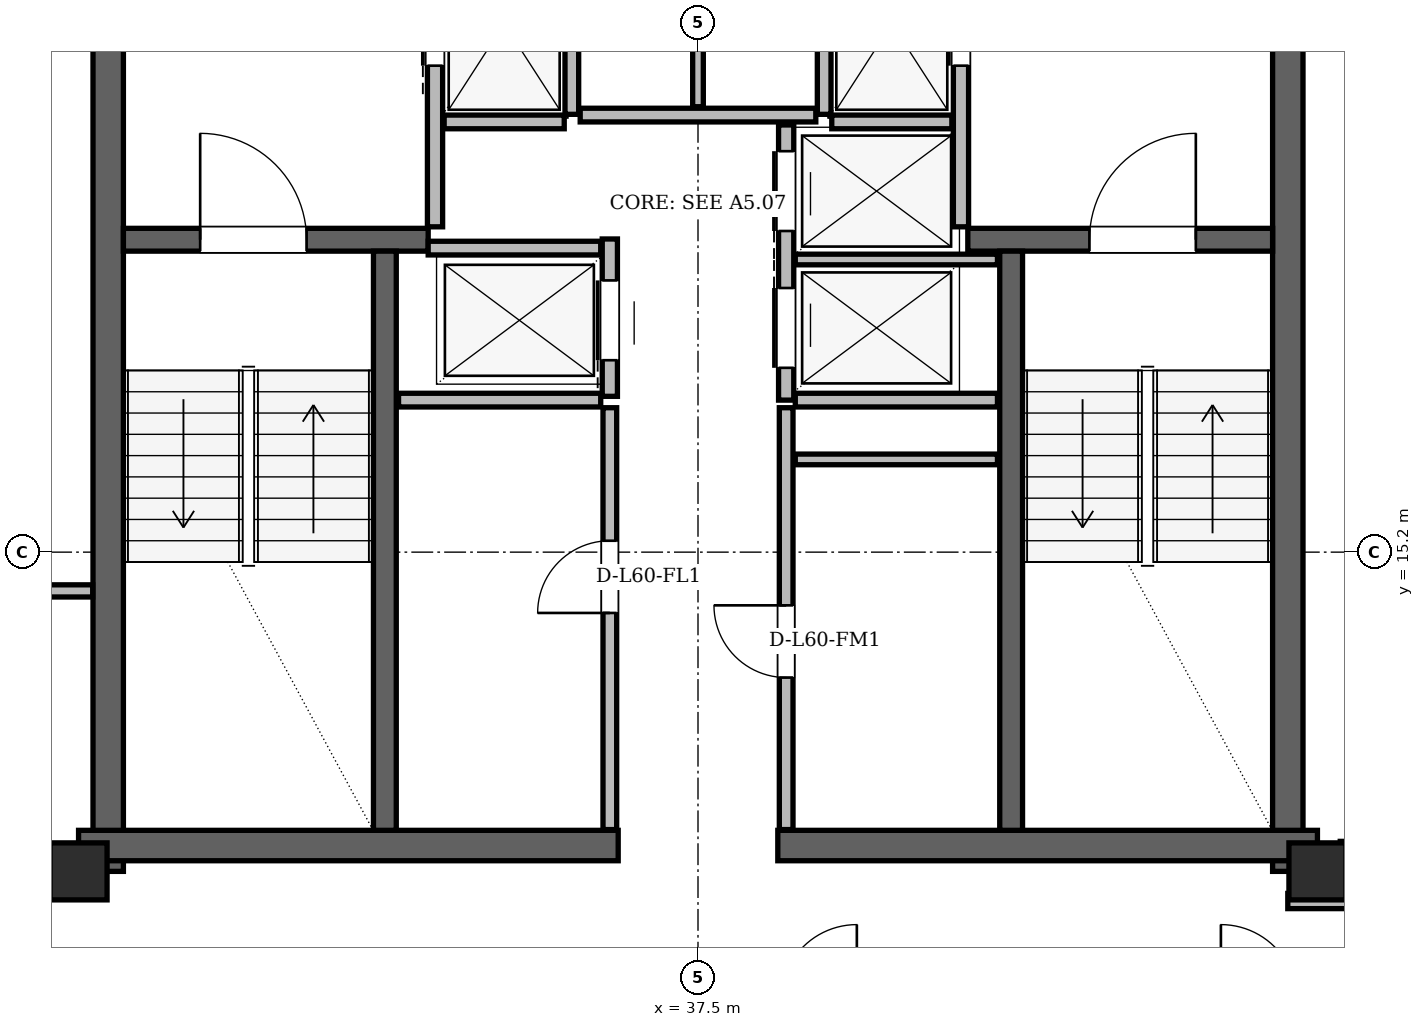
"""IFC4 building model, lengths in metres.
Left out: names, types, materials, properties, quantities, classifications, styles, units other than length and angle.
Written with IfcOpenShell. Run it as: python <this file> out.ifc"""

import sys

from ifc_helpers import new_model, si_unit, direction, frame, frame_2d, origin, origin_2d, place, context, subcontext, project, spatial, rectangle, hollow_rectangle, extrude, element, fill, save


model = new_model("IFC4")
c1 = context("Model", 3, precision=1e-05, world=origin(), true_north=direction((0.0, 1.0)))
c2 = subcontext(c1, "Body", "Model", "MODEL_VIEW")
j1 = project(units=[si_unit("LENGTHUNIT", "METRE"), si_unit("PLANEANGLEUNIT", "RADIAN")], contexts=[c1])
p1 = place(None, origin())
s1 = spatial("IfcSite", under=j1, at=p1, CompositionType="ELEMENT")
p2 = place(p1, origin())
s2 = spatial("IfcBuilding", under=s1, at=p2, CompositionType="ELEMENT")
p3 = place(p2, frame((0.0, 0.0, 227.1)))
s3 = spatial("IfcBuildingStorey", under=s2, at=p3, CompositionType="ELEMENT", Elevation=227.1)
for number, where, z_axis, x_axis in (
    (1, (29.35, 11.0, 0.0), (0.0, 0.0, 1.0), (1.0, 0.0, 0.0)),
    (2, (45.65, 11.0, 0.0), (0.0, 0.0, 1.0), (1.0, 0.0, 0.0)),
):
    element("IfcColumn", number, at=place(p3, frame(where, z_axis=z_axis, x_axis=x_axis)), inside=s3, PredefinedType="COLUMN", context=c2, shape_type="SweptSolid", body=[
        extrude(hollow_rectangle(XDim=0.75, YDim=0.75, WallThickness=0.06, at=origin_2d()), origin(), (0.0, 0.0, 1.0), 3.6),
    ])
for number, where, z_axis, x_axis in (
    (3, (29.74, 11.0, 0.0), (0.0, 0.0, 1.0), (0.0, 1.0, 0.0)),
    (4, (45.26, 11.0, 0.0), (0.0, 0.0, 1.0), (0.0, 1.0, 0.0)),
):
    element("IfcWall", number, at=place(p3, frame(where, z_axis=z_axis, x_axis=x_axis)), inside=s3, PredefinedType="SHEAR", context=c2, shape_type="SweptSolid", body=[
        extrude(rectangle(XDim=13.3, YDim=0.4, at=frame_2d((6.65, 0.0))), origin(), (0.0, 0.0, 1.0), 3.38),
    ])
for number, where, z_axis, x_axis in (
    (5, (29.35, 11.34, 0.0), (0.0, 0.0, 1.0), (1.0, 0.0, 0.0)),
    (6, (38.55, 11.34, 0.0), (0.0, 0.0, 1.0), (1.0, 0.0, 0.0)),
):
    element("IfcWall", number, at=place(p3, frame(where, z_axis=z_axis, x_axis=x_axis)), inside=s3, PredefinedType="SHEAR", context=c2, shape_type="SweptSolid", body=[
        extrude(rectangle(XDim=7.1, YDim=0.4, at=frame_2d((3.55, 0.0))), origin(), (0.0, 0.0, 1.0), 3.38),
    ])
p4 = place(p3, frame((29.94, 19.31, 0.0), z_axis=(0.0, 0.0, 1.0), x_axis=(1.0, 0.0, 0.0)))
e7 = element("IfcWall", 7, at=p4, inside=s3, PredefinedType="SHEAR", context=c2, shape_type="SweptSolid", body=[
    extrude(rectangle(XDim=4.01, YDim=0.3, at=frame_2d((2.005, 0.0))), origin(), (0.0, 0.0, 1.0), 3.38),
])
p5 = place(p4, frame((1.01, 0.0, 0.0)))
e8 = element("IfcOpeningElement", 8, at=p5, cuts=e7, PredefinedType="OPENING", context=c2, shape_type="SweptSolid", body=[
    extrude(rectangle(XDim=1.4, YDim=2.2, at=frame_2d((0.7, 1.1))), frame((0.0, 0.15, 0.0), z_axis=(0.0, -1.0, 0.0), x_axis=(1.0, 0.0, 0.0)), (0.0, 0.0, 1.0), 0.3),
])
p6 = place(p3, frame((41.05, 19.31, 0.0), z_axis=(0.0, 0.0, 1.0), x_axis=(1.0, 0.0, 0.0)))
e9 = element("IfcWall", 9, at=p6, inside=s3, PredefinedType="SHEAR", context=c2, shape_type="SweptSolid", body=[
    extrude(rectangle(XDim=4.01, YDim=0.3, at=frame_2d((2.005, 0.0))), origin(), (0.0, 0.0, 1.0), 3.38),
])
p7 = place(p6, frame((1.6, 0.0, 0.0)))
e10 = element("IfcOpeningElement", 10, at=p7, cuts=e9, PredefinedType="OPENING", context=c2, shape_type="SweptSolid", body=[
    extrude(rectangle(XDim=1.4, YDim=2.2, at=frame_2d((0.7, 1.1))), frame((0.0, 0.15, 0.0), z_axis=(0.0, -1.0, 0.0), x_axis=(1.0, 0.0, 0.0)), (0.0, 0.0, 1.0), 0.3),
])
for number, where, z_axis, x_axis in (
    (11, (33.38, 11.54, 0.0), (0.0, 0.0, 1.0), (0.0, 1.0, 0.0)),
    (12, (41.62, 11.54, 0.0), (0.0, 0.0, 1.0), (0.0, 1.0, 0.0)),
):
    element("IfcWall", number, at=place(p3, frame(where, z_axis=z_axis, x_axis=x_axis)), inside=s3, PredefinedType="SHEAR", context=c2, shape_type="SweptSolid", body=[
        extrude(rectangle(XDim=7.62, YDim=0.3, at=frame_2d((3.81, 0.0))), origin(), (0.0, 0.0, 1.0), 3.38),
    ])
p8 = place(p3, frame((34.344, 43.135, 0.0), z_axis=(0.0, 0.0, 1.0), x_axis=(-0.499998927115, -0.866026023214, 0.0)))
e13 = element("IfcWall", 13, at=p8, inside=s3, PredefinedType="SOLIDWALL", context=c2, shape_type="SweptSolid", body=[
    extrude(rectangle(XDim=36.742, YDim=0.29, at=frame_2d((18.371, 0.0))), origin(), (0.0, 0.0, 1.0), 2.677),
])
p9 = place(p8, frame((8.664, 0.0, 0.0)))
e14 = element("IfcOpeningElement", 14, at=p9, cuts=e13, PredefinedType="OPENING", context=c2, shape_type="SweptSolid", body=[
    extrude(rectangle(XDim=1.5, YDim=2.2, at=frame_2d((0.75, 1.1))), frame((0.0, 0.145, 0.0), z_axis=(0.0, -1.0, 0.0), x_axis=(1.0, 0.0, 0.0)), (0.0, 0.0, 1.0), 0.29),
])
p10 = place(p8, frame((28.452, 0.0, 0.0)))
e15 = element("IfcOpeningElement", 15, at=p10, cuts=e13, PredefinedType="OPENING", context=c2, shape_type="SweptSolid", body=[
    extrude(rectangle(XDim=1.5, YDim=2.2, at=frame_2d((0.75, 1.1))), frame((0.0, 0.145, 0.0), z_axis=(0.0, -1.0, 0.0), x_axis=(1.0, 0.0, 0.0)), (0.0, 0.0, 1.0), 0.29),
])
p11 = place(p8, frame((22.282, 0.0, 0.85)))
e16 = element("IfcOpeningElement", 16, at=p11, cuts=e13, PredefinedType="OPENING", context=c2, shape_type="SweptSolid", body=[
    extrude(rectangle(XDim=2.4, YDim=1.717, at=frame_2d((1.2, 0.858))), frame((0.0, 0.145, 0.0), z_axis=(0.0, -1.0, 0.0), x_axis=(1.0, 0.0, 0.0)), (0.0, 0.0, 1.0), 0.29),
])
p12 = place(p8, frame((33.369, 0.0, 0.85)))
e17 = element("IfcOpeningElement", 17, at=p12, cuts=e13, PredefinedType="OPENING", context=c2, shape_type="SweptSolid", body=[
    extrude(rectangle(XDim=2.2, YDim=1.717, at=frame_2d((1.1, 0.858))), frame((0.0, 0.145, 0.0), z_axis=(0.0, -1.0, 0.0), x_axis=(1.0, 0.0, 0.0)), (0.0, 0.0, 1.0), 0.29),
])
p13 = place(p8, frame((11.999, 0.0, 0.85)))
e18 = element("IfcOpeningElement", 18, at=p13, cuts=e13, PredefinedType="OPENING", context=c2, shape_type="SweptSolid", body=[
    extrude(rectangle(XDim=2.4, YDim=1.717, at=frame_2d((1.2, 0.858))), frame((0.0, 0.145, 0.0), z_axis=(0.0, -1.0, 0.0), x_axis=(1.0, 0.0, 0.0)), (0.0, 0.0, 1.0), 0.29),
])
p14 = place(p8, frame((16.783, 0.0, 0.85)))
e19 = element("IfcOpeningElement", 19, at=p14, cuts=e13, PredefinedType="OPENING", context=c2, shape_type="SweptSolid", body=[
    extrude(rectangle(XDim=1.8, YDim=1.717, at=frame_2d((0.9, 0.858))), frame((0.0, 0.145, 0.0), z_axis=(0.0, -1.0, 0.0), x_axis=(1.0, 0.0, 0.0)), (0.0, 0.0, 1.0), 0.29),
])
p15 = place(p8, frame((3.365, 0.0, 0.85)))
e20 = element("IfcOpeningElement", 20, at=p15, cuts=e13, PredefinedType="OPENING", context=c2, shape_type="SweptSolid", body=[
    extrude(rectangle(XDim=1.2, YDim=1.48, at=frame_2d((0.6, 0.74))), frame((0.0, 0.145, 0.0), z_axis=(0.0, -1.0, 0.0), x_axis=(1.0, 0.0, 0.0)), (0.0, 0.0, 1.0), 0.29),
])
p16 = place(p8, frame((6.797, 0.0, 0.85)))
e21 = element("IfcOpeningElement", 21, at=p16, cuts=e13, PredefinedType="OPENING", context=c2, shape_type="SweptSolid", body=[
    extrude(rectangle(XDim=1.2, YDim=1.48, at=frame_2d((0.6, 0.74))), frame((0.0, 0.145, 0.0), z_axis=(0.0, -1.0, 0.0), x_axis=(1.0, 0.0, 0.0)), (0.0, 0.0, 1.0), 0.29),
])
p17 = place(p3, frame((34.04, 19.48, 0.0), z_axis=(0.0, 0.0, 1.0), x_axis=(0.0, 1.0, 0.0)))
e22 = element("IfcWall", 22, at=p17, inside=s3, PredefinedType="PARTITIONING", context=c2, shape_type="SweptSolid", body=[
    extrude(rectangle(XDim=4.5, YDim=0.2, at=frame_2d((2.25, 0.0))), origin(), (0.0, 0.0, 1.0), 3.38),
])
p18 = place(p17, frame((2.12, 0.0, 0.0)))
e23 = element("IfcOpeningElement", 23, at=p18, cuts=e22, PredefinedType="OPENING", context=c2, shape_type="SweptSolid", body=[
    extrude(rectangle(XDim=1.1, YDim=2.2, at=frame_2d((0.55, 1.1))), frame((0.0, 0.1, 0.0), z_axis=(0.0, -1.0, 0.0), x_axis=(1.0, 0.0, 0.0)), (0.0, 0.0, 1.0), 0.2),
])
p19 = place(p3, frame((35.84, 20.96, 0.0), z_axis=(0.0, 0.0, 1.0), x_axis=(0.0, 1.0, 0.0)))
e24 = element("IfcWall", 24, at=p19, inside=s3, PredefinedType="PARTITIONING", context=c2, shape_type="SweptSolid", body=[
    extrude(rectangle(XDim=3.02, YDim=0.18, at=frame_2d((1.51, 0.0))), origin(), (0.0, 0.0, 1.0), 3.38),
])
p20 = place(p3, frame((34.16, 20.86, 0.0), z_axis=(0.0, 0.0, 1.0), x_axis=(1.0, 0.0, 0.0)))
e25 = element("IfcWall", 25, at=p20, inside=s3, PredefinedType="PARTITIONING", context=c2, shape_type="SweptSolid", body=[
    extrude(rectangle(XDim=1.58, YDim=0.18, at=frame_2d((0.79, 0.0))), origin(), (0.0, 0.0, 1.0), 3.38),
])
p21 = place(p3, frame((40.96, 19.48, 0.0), z_axis=(0.0, 0.0, 1.0), x_axis=(0.0, 1.0, 0.0)))
e26 = element("IfcWall", 26, at=p21, inside=s3, PredefinedType="PARTITIONING", context=c2, shape_type="SweptSolid", body=[
    extrude(rectangle(XDim=4.5, YDim=0.2, at=frame_2d((2.25, 0.0))), origin(), (0.0, 0.0, 1.0), 3.38),
])
p22 = place(p21, frame((2.12, 0.0, 0.0)))
e27 = element("IfcOpeningElement", 27, at=p22, cuts=e26, PredefinedType="OPENING", context=c2, shape_type="SweptSolid", body=[
    extrude(rectangle(XDim=1.1, YDim=2.2, at=frame_2d((0.55, 1.1))), frame((0.0, 0.1, 0.0), z_axis=(0.0, -1.0, 0.0), x_axis=(1.0, 0.0, 0.0)), (0.0, 0.0, 1.0), 0.2),
])
p23 = place(p3, frame((39.16, 20.96, 0.0), z_axis=(0.0, 0.0, 1.0), x_axis=(0.0, 1.0, 0.0)))
e28 = element("IfcWall", 28, at=p23, inside=s3, PredefinedType="PARTITIONING", context=c2, shape_type="SweptSolid", body=[
    extrude(rectangle(XDim=3.02, YDim=0.18, at=frame_2d((1.51, 0.0))), origin(), (0.0, 0.0, 1.0), 3.38),
])
p24 = place(p3, frame((39.26, 20.86, 0.0), z_axis=(0.0, 0.0, 1.0), x_axis=(1.0, 0.0, 0.0)))
e29 = element("IfcWall", 29, at=p24, inside=s3, PredefinedType="PARTITIONING", context=c2, shape_type="SweptSolid", body=[
    extrude(rectangle(XDim=1.58, YDim=0.18, at=frame_2d((0.79, 0.0))), origin(), (0.0, 0.0, 1.0), 3.38),
])
p25 = place(p3, frame((36.34, 17.25, 0.0), z_axis=(0.0, 0.0, 1.0), x_axis=(0.0, 1.0, 0.0)))
e30 = element("IfcWall", 30, at=p25, inside=s3, PredefinedType="PARTITIONING", context=c2, shape_type="SweptSolid", body=[
    extrude(rectangle(XDim=2.07, YDim=0.2, at=frame_2d((1.035, 0.0))), origin(), (0.0, 0.0, 1.0), 3.38),
])
p26 = place(p25, frame((0.475, 0.0, 0.0)))
e31 = element("IfcOpeningElement", 31, at=p26, cuts=e30, PredefinedType="OPENING", context=c2, shape_type="SweptSolid", body=[
    extrude(rectangle(XDim=1.05, YDim=2.15, at=frame_2d((0.525, 1.075))), frame((0.0, 0.1, 0.0), z_axis=(0.0, -1.0, 0.0), x_axis=(1.0, 0.0, 0.0)), (0.0, 0.0, 1.0), 0.2),
])
p27 = place(p3, frame((33.95, 19.2, 0.0), z_axis=(0.0, 0.0, 1.0), x_axis=(1.0, 0.0, 0.0)))
e32 = element("IfcWall", 32, at=p27, inside=s3, PredefinedType="PARTITIONING", context=c2, shape_type="SweptSolid", body=[
    extrude(rectangle(XDim=2.27, YDim=0.18, at=frame_2d((1.135, 0.0))), origin(), (0.0, 0.0, 1.0), 3.38),
])
p28 = place(p3, frame((33.56, 17.2, 0.0), z_axis=(0.0, 0.0, 1.0), x_axis=(1.0, 0.0, 0.0)))
e33 = element("IfcWall", 33, at=p28, inside=s3, PredefinedType="PARTITIONING", context=c2, shape_type="SweptSolid", body=[
    extrude(rectangle(XDim=2.66, YDim=0.18, at=frame_2d((1.33, 0.0))), origin(), (0.0, 0.0, 1.0), 3.38),
])
p29 = place(p3, frame((36.34, 11.55, 0.0), z_axis=(0.0, 0.0, 1.0), x_axis=(0.0, 1.0, 0.0)))
e34 = element("IfcWall", 34, at=p29, inside=s3, PredefinedType="PARTITIONING", context=c2, shape_type="SweptSolid", body=[
    extrude(rectangle(XDim=5.55, YDim=0.18, at=frame_2d((2.775, 0.0))), origin(), (0.0, 0.0, 1.0), 3.38),
])
p30 = place(p29, frame((2.85, 0.0, 0.0)))
e35 = element("IfcOpeningElement", 35, at=p30, cuts=e34, PredefinedType="OPENING", context=c2, shape_type="SweptSolid", body=[
    extrude(rectangle(XDim=0.95, YDim=2.1, at=frame_2d((0.475, 1.05))), frame((0.0, 0.09, 0.0), z_axis=(0.0, -1.0, 0.0), x_axis=(1.0, 0.0, 0.0)), (0.0, 0.0, 1.0), 0.18),
])
p31 = place(p3, frame((38.66, 17.2, 0.0), z_axis=(0.0, 0.0, 1.0), x_axis=(0.0, 1.0, 0.0)))
e36 = element("IfcWall", 36, at=p31, inside=s3, PredefinedType="PARTITIONING", context=c2, shape_type="SweptSolid", body=[
    extrude(rectangle(XDim=3.62, YDim=0.2, at=frame_2d((1.81, 0.0))), origin(), (0.0, 0.0, 1.0), 3.38),
])
p32 = place(p31, frame((0.425, 0.0, 0.0)))
e37 = element("IfcOpeningElement", 37, at=p32, cuts=e36, PredefinedType="OPENING", context=c2, shape_type="SweptSolid", body=[
    extrude(rectangle(XDim=1.05, YDim=2.15, at=frame_2d((0.525, 1.075))), frame((0.0, 0.1, 0.0), z_axis=(0.0, -1.0, 0.0), x_axis=(1.0, 0.0, 0.0)), (0.0, 0.0, 1.0), 0.2),
])
p33 = place(p31, frame((2.225, 0.0, 0.0)))
e38 = element("IfcOpeningElement", 38, at=p33, cuts=e36, PredefinedType="OPENING", context=c2, shape_type="SweptSolid", body=[
    extrude(rectangle(XDim=1.05, YDim=2.15, at=frame_2d((0.525, 1.075))), frame((0.0, 0.1, 0.0), z_axis=(0.0, -1.0, 0.0), x_axis=(1.0, 0.0, 0.0)), (0.0, 0.0, 1.0), 0.2),
])
p34 = place(p3, frame((38.78, 17.2, 0.0), z_axis=(0.0, 0.0, 1.0), x_axis=(1.0, 0.0, 0.0)))
e39 = element("IfcWall", 39, at=p34, inside=s3, PredefinedType="PARTITIONING", context=c2, shape_type="SweptSolid", body=[
    extrude(rectangle(XDim=2.66, YDim=0.18, at=frame_2d((1.33, 0.0))), origin(), (0.0, 0.0, 1.0), 3.38),
])
p35 = place(p3, frame((38.78, 19.05, 0.0), z_axis=(0.0, 0.0, 1.0), x_axis=(1.0, 0.0, 0.0)))
e40 = element("IfcWall", 40, at=p35, inside=s3, PredefinedType="PARTITIONING", context=c2, shape_type="SweptSolid", body=[
    extrude(rectangle(XDim=2.66, YDim=0.14, at=frame_2d((1.33, 0.0))), origin(), (0.0, 0.0, 1.0), 3.38),
])
p36 = place(p3, frame((38.66, 11.55, 0.0), z_axis=(0.0, 0.0, 1.0), x_axis=(0.0, 1.0, 0.0)))
e41 = element("IfcWall", 41, at=p36, inside=s3, PredefinedType="PARTITIONING", context=c2, shape_type="SweptSolid", body=[
    extrude(rectangle(XDim=5.55, YDim=0.18, at=frame_2d((2.775, 0.0))), origin(), (0.0, 0.0, 1.0), 3.38),
])
p37 = place(p36, frame((2.0, 0.0, 0.0)))
e42 = element("IfcOpeningElement", 42, at=p37, cuts=e41, PredefinedType="OPENING", context=c2, shape_type="SweptSolid", body=[
    extrude(rectangle(XDim=0.95, YDim=2.1, at=frame_2d((0.475, 1.05))), frame((0.0, 0.09, 0.0), z_axis=(0.0, -1.0, 0.0), x_axis=(1.0, 0.0, 0.0)), (0.0, 0.0, 1.0), 0.18),
])
p38 = place(p3, frame((38.78, 16.42, 0.0), z_axis=(0.0, 0.0, 1.0), x_axis=(1.0, 0.0, 0.0)))
e43 = element("IfcWall", 43, at=p38, inside=s3, PredefinedType="PARTITIONING", context=c2, shape_type="SweptSolid", body=[
    extrude(rectangle(XDim=2.66, YDim=0.14, at=frame_2d((1.33, 0.0))), origin(), (0.0, 0.0, 1.0), 3.38),
])
p39 = place(p3, frame((35.95, 20.95, 0.0), z_axis=(0.0, 0.0, 1.0), x_axis=(1.0, 0.0, 0.0)))
e44 = element("IfcWall", 44, at=p39, inside=s3, PredefinedType="PARTITIONING", context=c2, shape_type="SweptSolid", body=[
    extrude(rectangle(XDim=3.1, YDim=0.18, at=frame_2d((1.55, 0.0))), origin(), (0.0, 0.0, 1.0), 3.38),
])
p40 = place(p3, frame((37.5, 21.06, 0.0), z_axis=(0.0, 0.0, 1.0), x_axis=(0.0, 1.0, 0.0)))
e45 = element("IfcWall", 45, at=p40, inside=s3, PredefinedType="PARTITIONING", context=c2, shape_type="SweptSolid", body=[
    extrude(rectangle(XDim=2.92, YDim=0.14, at=frame_2d((1.46, 0.0))), origin(), (0.0, 0.0, 1.0), 3.38),
])
p41 = place(p3, frame((45.26, 10.61, 0.0), z_axis=(0.0, 0.0, 1.0), x_axis=(1.0, 0.0, 0.0)))
e46 = element("IfcWall", 46, at=p41, inside=s3, PredefinedType="PARTITIONING", context=c2, shape_type="SweptSolid", body=[
    extrude(rectangle(XDim=0.78, YDim=0.2, at=frame_2d((0.39, 0.0))), origin(), (0.0, 0.0, 1.0), 3.38),
])
p42 = place(p3, frame((18.094, 14.69, 0.0), z_axis=(0.0, 0.0, 1.0), x_axis=(1.0, 0.0, 0.0)))
e47 = element("IfcWall", 47, at=p42, inside=s3, PredefinedType="PARTITIONING", context=c2, shape_type="SweptSolid", body=[
    extrude(rectangle(XDim=11.442, YDim=0.16, at=frame_2d((5.721, 0.0))), origin(), (0.0, 0.0, 1.0), 2.52),
])
p43 = place(p42, frame((0.493, 0.0, 0.0)))
e48 = element("IfcOpeningElement", 48, at=p43, cuts=e47, PredefinedType="OPENING", context=c2, shape_type="SweptSolid", body=[
    extrude(rectangle(XDim=0.88, YDim=2.08, at=frame_2d((0.44, 1.04))), frame((0.0, 0.08, 0.0), z_axis=(0.0, -1.0, 0.0), x_axis=(1.0, 0.0, 0.0)), (0.0, 0.0, 1.0), 0.16),
])
p44 = place(p42, frame((2.443, 0.0, 0.0)))
e49 = element("IfcOpeningElement", 49, at=p44, cuts=e47, PredefinedType="OPENING", context=c2, shape_type="SweptSolid", body=[
    extrude(rectangle(XDim=0.95, YDim=2.1, at=frame_2d((0.475, 1.05))), frame((0.0, 0.08, 0.0), z_axis=(0.0, -1.0, 0.0), x_axis=(1.0, 0.0, 0.0)), (0.0, 0.0, 1.0), 0.16),
])
p45 = place(p42, frame((7.27, 0.0, 0.0)))
e50 = element("IfcOpeningElement", 50, at=p45, cuts=e47, PredefinedType="OPENING", context=c2, shape_type="SweptSolid", body=[
    extrude(rectangle(XDim=0.92, YDim=2.12, at=frame_2d((0.46, 1.06))), frame((0.0, 0.08, 0.0), z_axis=(0.0, -1.0, 0.0), x_axis=(1.0, 0.0, 0.0)), (0.0, 0.0, 1.0), 0.16),
])
p46 = place(p3, frame((46.05, 10.95, 0.0), z_axis=(0.0, 0.0, 1.0), x_axis=(0.0, 1.0, 0.0)))
e51 = element("IfcWall", 51, at=p46, inside=s3, PredefinedType="PARTITIONING", context=c2, shape_type="SweptSolid", body=[
    extrude(rectangle(XDim=0.445, YDim=0.2, at=frame_2d((0.223, 0.0))), origin(), (0.0, 0.0, 1.0), 2.913),
])
p47 = place(p30, origin())
e52 = element("IfcDoor", 52, at=p47, inside=s3, OperationType="SINGLE_SWING_LEFT", PredefinedType="DOOR", context=c2, shape_type="SweptSolid", body=[
    extrude(rectangle(XDim=0.95, YDim=2.1, at=frame_2d((0.475, 1.05))), frame((0.0, 0.025, 0.0), z_axis=(0.0, -1.0, 0.0), x_axis=(1.0, 0.0, 0.0)), (0.0, 0.0, 1.0), 0.05),
])
fill(e35, e52)
p48 = place(p37, origin())
e53 = element("IfcDoor", 53, at=p48, inside=s3, OperationType="SINGLE_SWING_RIGHT", PredefinedType="DOOR", context=c2, shape_type="SweptSolid", body=[
    extrude(rectangle(XDim=0.95, YDim=2.1, at=frame_2d((0.475, 1.05))), frame((0.0, 0.025, 0.0), z_axis=(0.0, -1.0, 0.0), x_axis=(1.0, 0.0, 0.0)), (0.0, 0.0, 1.0), 0.05),
])
fill(e42, e53)
p49 = place(p18, origin())
e54 = element("IfcDoor", 54, at=p49, inside=s3, OperationType="SLIDING_TO_LEFT", PredefinedType="DOOR", context=c2, shape_type="SweptSolid", body=[
    extrude(rectangle(XDim=1.1, YDim=2.2, at=frame_2d((0.55, 1.1))), frame((0.0, 0.025, 0.0), z_axis=(0.0, -1.0, 0.0), x_axis=(1.0, 0.0, 0.0)), (0.0, 0.0, 1.0), 0.05),
])
fill(e23, e54)
p50 = place(p22, origin())
e55 = element("IfcDoor", 55, at=p50, inside=s3, OperationType="SLIDING_TO_RIGHT", PredefinedType="DOOR", context=c2, shape_type="SweptSolid", body=[
    extrude(rectangle(XDim=1.1, YDim=2.2, at=frame_2d((0.55, 1.1))), frame((0.0, 0.025, 0.0), z_axis=(0.0, -1.0, 0.0), x_axis=(1.0, 0.0, 0.0)), (0.0, 0.0, 1.0), 0.05),
])
fill(e27, e55)
p51 = place(p26, origin())
e56 = element("IfcDoor", 56, at=p51, inside=s3, OperationType="SLIDING_TO_LEFT", PredefinedType="DOOR", context=c2, shape_type="SweptSolid", body=[
    extrude(rectangle(XDim=1.05, YDim=2.15, at=frame_2d((0.525, 1.075))), frame((0.0, 0.025, 0.0), z_axis=(0.0, -1.0, 0.0), x_axis=(1.0, 0.0, 0.0)), (0.0, 0.0, 1.0), 0.05),
])
fill(e31, e56)
p52 = place(p32, origin())
e57 = element("IfcDoor", 57, at=p52, inside=s3, OperationType="SLIDING_TO_RIGHT", PredefinedType="DOOR", context=c2, shape_type="SweptSolid", body=[
    extrude(rectangle(XDim=1.05, YDim=2.15, at=frame_2d((0.525, 1.075))), frame((0.0, 0.025, 0.0), z_axis=(0.0, -1.0, 0.0), x_axis=(1.0, 0.0, 0.0)), (0.0, 0.0, 1.0), 0.05),
])
fill(e37, e57)
p53 = place(p33, origin())
e58 = element("IfcDoor", 58, at=p53, inside=s3, OperationType="SLIDING_TO_LEFT", PredefinedType="DOOR", context=c2, shape_type="SweptSolid", body=[
    extrude(rectangle(XDim=1.05, YDim=2.15, at=frame_2d((0.525, 1.075))), frame((0.0, 0.025, 0.0), z_axis=(0.0, -1.0, 0.0), x_axis=(1.0, 0.0, 0.0)), (0.0, 0.0, 1.0), 0.05),
])
fill(e38, e58)
p54 = place(p5, origin())
e59 = element("IfcDoor", 59, at=p54, inside=s3, OperationType="SINGLE_SWING_LEFT", PredefinedType="DOOR", context=c2, shape_type="SweptSolid", body=[
    extrude(rectangle(XDim=1.4, YDim=2.2, at=frame_2d((0.7, 1.1))), frame((0.0, 0.025, 0.0), z_axis=(0.0, -1.0, 0.0), x_axis=(1.0, 0.0, 0.0)), (0.0, 0.0, 1.0), 0.05),
])
fill(e8, e59)
p55 = place(p7, origin())
e60 = element("IfcDoor", 60, at=p55, inside=s3, OperationType="SINGLE_SWING_RIGHT", PredefinedType="DOOR", context=c2, shape_type="SweptSolid", body=[
    extrude(rectangle(XDim=1.4, YDim=2.2, at=frame_2d((0.7, 1.1))), frame((0.0, 0.025, 0.0), z_axis=(0.0, -1.0, 0.0), x_axis=(1.0, 0.0, 0.0)), (0.0, 0.0, 1.0), 0.05),
])
fill(e10, e60)
save(model, sys.argv[1])
